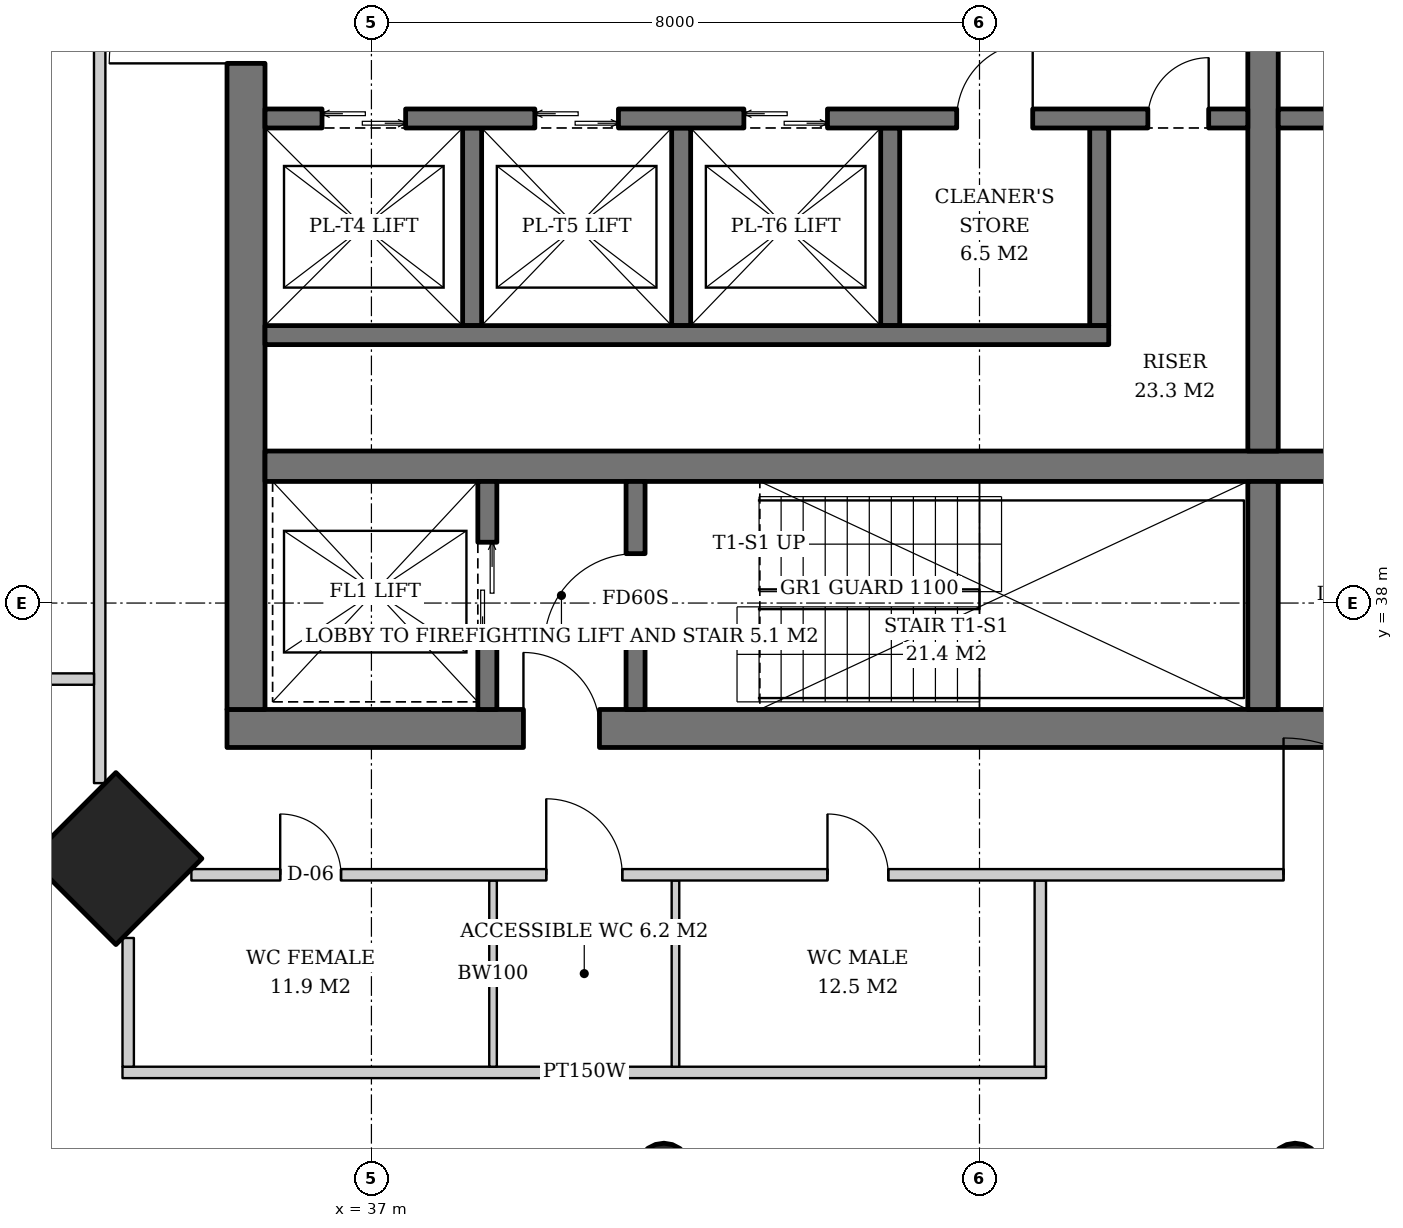
"""IFC4 building model, lengths in metres.
Left out: names, types, materials, properties, quantities, classifications, styles, units other than length and angle.
Written with IfcOpenShell. Run it as: python <this file> out.ifc"""

import sys

from ifc_helpers import new_model, si_unit, direction, frame, frame_2d, origin, origin_2d, place, context, subcontext, project, spatial, rectangle, hollow_circle, extrude, element, fill, save


model = new_model("IFC4")
c1 = context("Model", 3, precision=1e-05, world=origin(), true_north=direction((0.0, 1.0)))
c2 = subcontext(c1, "Body", "Model", "MODEL_VIEW")
j1 = project(units=[si_unit("LENGTHUNIT", "METRE"), si_unit("PLANEANGLEUNIT", "RADIAN")], contexts=[c1])
p1 = place(None, origin())
s1 = spatial("IfcSite", under=j1, at=p1, CompositionType="ELEMENT")
p2 = place(p1, origin())
s2 = spatial("IfcBuilding", under=s1, at=p2, CompositionType="ELEMENT")
p3 = place(p2, frame((0.0, 0.0, 287.0)))
s3 = spatial("IfcBuildingStorey", under=s2, at=p3, CompositionType="ELEMENT", Elevation=287.0)
p4 = place(p3, frame((33.6, 34.6, 0.0), z_axis=(0.031898107953, 0.031898107953, 0.998981992539), x_axis=(-0.707106781187, 0.707106781187, 0.0)))
e1 = element("IfcColumn", 1, at=p4, inside=s3, PredefinedType="COLUMN", context=c2, shape_type="SweptSolid", body=[
    extrude(rectangle(XDim=1.6, YDim=1.6, at=origin_2d()), origin(), (0.0, 0.0, 1.0), 3.804),
])
p5 = place(p3, frame((32.5, 30.5, 0.0), z_axis=(0.031898107953, 0.031898107953, 0.998981992539), x_axis=(-0.707106781187, 0.707106781187, 0.0)))
e2 = element("IfcColumn", 2, at=p5, inside=s3, PredefinedType="COLUMN", context=c2, shape_type="SweptSolid", body=[
    extrude(hollow_circle(Radius=0.355, WallThickness=0.025, at=origin_2d()), origin(), (0.0, 0.0, 1.0), 3.804),
])
for number, where, z_axis, x_axis in (
    (3, (40.833, 30.5, 0.0), (0.011, 0.032, 0.999), (-0.948, 0.317, 0.0)),
    (4, (49.167, 30.5, 0.0), (-0.011, 0.032, 0.999), (-0.948, -0.317, 0.0)),
):
    element("IfcColumn", number, at=place(p3, frame(where, z_axis=z_axis, x_axis=x_axis)), inside=s3, PredefinedType="COLUMN", context=c2, shape_type="SweptSolid", body=[
        extrude(hollow_circle(Radius=0.355, WallThickness=0.025, at=origin_2d()), origin(), (0.0, 0.0, 1.0), 3.802),
    ])
p6 = place(p3, frame((35.1, 36.35, 0.0), z_axis=(0.0, 0.0, 1.0), x_axis=(1.0, 0.0, 0.0)))
e5 = element("IfcWall", 5, at=p6, inside=s3, PredefinedType="SHEAR", context=c2, shape_type="SweptSolid", body=[
    extrude(rectangle(XDim=19.8, YDim=0.5, at=frame_2d((9.9, 0.0))), origin(), (0.0, 0.0, 1.0), 3.8),
])
p7 = place(p6, frame((3.9, 0.0, 0.0)))
e6 = element("IfcOpeningElement", 6, at=p7, cuts=e5, PredefinedType="OPENING", context=c2, shape_type="SweptSolid", body=[
    extrude(rectangle(XDim=1.0, YDim=2.1, at=frame_2d((0.5, 1.05))), frame((0.0, 0.26, 0.0), z_axis=(0.0, -1.0, 0.0), x_axis=(1.0, 0.0, 0.0)), (0.0, 0.0, 1.0), 0.52),
])
p8 = place(p6, frame((15.35, 0.0, 0.0)))
e7 = element("IfcOpeningElement", 7, at=p8, cuts=e5, PredefinedType="OPENING", context=c2, shape_type="SweptSolid", body=[
    extrude(rectangle(XDim=1.0, YDim=2.1, at=frame_2d((0.5, 1.05))), frame((0.0, 0.26, 0.0), z_axis=(0.0, -1.0, 0.0), x_axis=(1.0, 0.0, 0.0)), (0.0, 0.0, 1.0), 0.52),
])
p9 = place(p3, frame((35.35, 36.6, 0.0), z_axis=(0.0, 0.0, 1.0), x_axis=(0.0, 1.0, 0.0)))
e8 = element("IfcWall", 8, at=p9, inside=s3, PredefinedType="SHEAR", context=c2, shape_type="SweptSolid", body=[
    extrude(rectangle(XDim=18.8, YDim=0.5, at=frame_2d((9.4, 0.0))), origin(), (0.0, 0.0, 1.0), 3.8),
])
p10 = place(p9, frame((8.5, 0.0, 0.0)))
e9 = element("IfcOpeningElement", 9, at=p10, cuts=e8, PredefinedType="OPENING", context=c2, shape_type="SweptSolid", body=[
    extrude(rectangle(XDim=1.8, YDim=2.4, at=frame_2d((0.9, 1.2))), frame((0.0, 0.26, 0.0), z_axis=(0.0, -1.0, 0.0), x_axis=(1.0, 0.0, 0.0)), (0.0, 0.0, 1.0), 0.52),
])
p11 = place(p3, frame((35.6, 39.8, 0.0), z_axis=(0.0, 0.0, 1.0), x_axis=(1.0, 0.0, 0.0)))
e10 = element("IfcWall", 10, at=p11, inside=s3, PredefinedType="SHEAR", context=c2, shape_type="SweptSolid", body=[
    extrude(rectangle(XDim=18.8, YDim=0.4, at=frame_2d((9.4, 0.0))), origin(), (0.0, 0.0, 1.0), 3.8),
])
p12 = place(p3, frame((48.73, 36.6, 0.0), z_axis=(0.0, 0.0, 1.0), x_axis=(0.0, 1.0, 0.0)))
e11 = element("IfcWall", 11, at=p12, inside=s3, PredefinedType="SHEAR", context=c2, shape_type="SweptSolid", body=[
    extrude(rectangle(XDim=3.0, YDim=0.4, at=frame_2d((1.5, 0.0))), origin(), (0.0, 0.0, 1.0), 3.8),
])
p13 = place(p3, frame((48.73, 40.0, 0.0), z_axis=(0.0, 0.0, 1.0), x_axis=(0.0, 1.0, 0.0)))
e12 = element("IfcWall", 12, at=p13, inside=s3, PredefinedType="SHEAR", context=c2, shape_type="SweptSolid", body=[
    extrude(rectangle(XDim=12.0, YDim=0.4, at=frame_2d((6.0, 0.0))), origin(), (0.0, 0.0, 1.0), 3.8),
])
p14 = place(p3, frame((38.525, 36.6, 0.0), z_axis=(0.0, 0.0, 1.0), x_axis=(0.0, 1.0, 0.0)))
e13 = element("IfcWall", 13, at=p14, inside=s3, PredefinedType="SHEAR", context=c2, shape_type="SweptSolid", body=[
    extrude(rectangle(XDim=3.0, YDim=0.25, at=frame_2d((1.5, 0.0))), origin(), (0.0, 0.0, 1.0), 3.8),
])
p15 = place(p14, frame((0.9, 0.0, 0.0)))
e14 = element("IfcOpeningElement", 14, at=p15, cuts=e13, PredefinedType="OPENING", context=c2, shape_type="SweptSolid", body=[
    extrude(rectangle(XDim=1.3, YDim=2.2, at=frame_2d((0.65, 1.1))), frame((0.0, 0.135, 0.0), z_axis=(0.0, -1.0, 0.0), x_axis=(1.0, 0.0, 0.0)), (0.0, 0.0, 1.0), 0.27),
])
p16 = place(p3, frame((40.475, 36.6, 0.0), z_axis=(0.0, 0.0, 1.0), x_axis=(0.0, 1.0, 0.0)))
e15 = element("IfcWall", 15, at=p16, inside=s3, PredefinedType="SHEAR", context=c2, shape_type="SweptSolid", body=[
    extrude(rectangle(XDim=3.0, YDim=0.25, at=frame_2d((1.5, 0.0))), origin(), (0.0, 0.0, 1.0), 3.8),
])
p17 = place(p16, frame((0.85, 0.0, 0.0)))
e16 = element("IfcOpeningElement", 16, at=p17, cuts=e15, PredefinedType="OPENING", context=c2, shape_type="SweptSolid", body=[
    extrude(rectangle(XDim=1.2, YDim=2.1, at=frame_2d((0.6, 1.05))), frame((0.0, 0.135, 0.0), z_axis=(0.0, -1.0, 0.0), x_axis=(1.0, 0.0, 0.0)), (0.0, 0.0, 1.0), 0.27),
])
for number, where, z_axis, x_axis in (
    (17, (38.325, 44.25, 0.0), (0.0, 0.0, 1.0), (0.0, -1.0, 0.0)),
    (18, (41.075, 44.25, 0.0), (0.0, 0.0, 1.0), (0.0, -1.0, 0.0)),
    (19, (43.825, 44.25, 0.0), (0.0, 0.0, 1.0), (0.0, -1.0, 0.0)),
    (20, (46.575, 44.25, 0.0), (0.0, 0.0, 1.0), (0.0, -1.0, 0.0)),
):
    element("IfcWall", number, at=place(p3, frame(where, z_axis=z_axis, x_axis=x_axis)), inside=s3, PredefinedType="SHEAR", context=c2, shape_type="SweptSolid", body=[
        extrude(rectangle(XDim=2.6, YDim=0.25, at=frame_2d((1.3, 0.0))), origin(), (0.0, 0.0, 1.0), 3.8),
    ])
p18 = place(p3, frame((35.6, 41.525, 0.0), z_axis=(0.0, 0.0, 1.0), x_axis=(1.0, 0.0, 0.0)))
e21 = element("IfcWall", 21, at=p18, inside=s3, PredefinedType="SHEAR", context=c2, shape_type="SweptSolid", body=[
    extrude(rectangle(XDim=11.1, YDim=0.25, at=frame_2d((5.55, 0.0))), origin(), (0.0, 0.0, 1.0), 3.8),
])
p19 = place(p3, frame((35.6, 44.375, 0.0), z_axis=(0.0, 0.0, 1.0), x_axis=(1.0, 0.0, 0.0)))
e22 = element("IfcWall", 22, at=p19, inside=s3, PredefinedType="SHEAR", context=c2, shape_type="SweptSolid", body=[
    extrude(rectangle(XDim=12.93, YDim=0.25, at=frame_2d((6.465, 0.0))), origin(), (0.0, 0.0, 1.0), 3.8),
])
p20 = place(p19, frame((0.75, 0.0, 0.0)))
e23 = element("IfcOpeningElement", 23, at=p20, cuts=e22, PredefinedType="OPENING", context=c2, shape_type="SweptSolid", body=[
    extrude(rectangle(XDim=1.1, YDim=2.2, at=frame_2d((0.55, 1.1))), frame((0.0, 0.135, 0.0), z_axis=(0.0, -1.0, 0.0), x_axis=(1.0, 0.0, 0.0)), (0.0, 0.0, 1.0), 0.27),
])
p21 = place(p19, frame((3.55, 0.0, 0.0)))
e24 = element("IfcOpeningElement", 24, at=p21, cuts=e22, PredefinedType="OPENING", context=c2, shape_type="SweptSolid", body=[
    extrude(rectangle(XDim=1.1, YDim=2.2, at=frame_2d((0.55, 1.1))), frame((0.0, 0.135, 0.0), z_axis=(0.0, -1.0, 0.0), x_axis=(1.0, 0.0, 0.0)), (0.0, 0.0, 1.0), 0.27),
])
p22 = place(p19, frame((6.3, 0.0, 0.0)))
e25 = element("IfcOpeningElement", 25, at=p22, cuts=e22, PredefinedType="OPENING", context=c2, shape_type="SweptSolid", body=[
    extrude(rectangle(XDim=1.1, YDim=2.2, at=frame_2d((0.55, 1.1))), frame((0.0, 0.135, 0.0), z_axis=(0.0, -1.0, 0.0), x_axis=(1.0, 0.0, 0.0)), (0.0, 0.0, 1.0), 0.27),
])
p23 = place(p19, frame((9.1, 0.0, 0.0)))
e26 = element("IfcOpeningElement", 26, at=p23, cuts=e22, PredefinedType="OPENING", context=c2, shape_type="SweptSolid", body=[
    extrude(rectangle(XDim=1.0, YDim=2.1, at=frame_2d((0.5, 1.05))), frame((0.0, 0.135, 0.0), z_axis=(0.0, -1.0, 0.0), x_axis=(1.0, 0.0, 0.0)), (0.0, 0.0, 1.0), 0.27),
])
p24 = place(p19, frame((11.615, 0.0, 0.0)))
e27 = element("IfcOpeningElement", 27, at=p24, cuts=e22, PredefinedType="OPENING", context=c2, shape_type="SweptSolid", body=[
    extrude(rectangle(XDim=0.8, YDim=2.0, at=frame_2d((0.4, 1.0))), frame((0.0, 0.135, 0.0), z_axis=(0.0, -1.0, 0.0), x_axis=(1.0, 0.0, 0.0)), (0.0, 0.0, 1.0), 0.27),
])
p25 = place(p3, frame((48.93, 44.375, 0.0), z_axis=(0.0, 0.0, 1.0), x_axis=(1.0, 0.0, 0.0)))
e28 = element("IfcWall", 28, at=p25, inside=s3, PredefinedType="SHEAR", context=c2, shape_type="SweptSolid", body=[
    extrude(rectangle(XDim=5.47, YDim=0.25, at=frame_2d((2.735, 0.0))), origin(), (0.0, 0.0, 1.0), 3.8),
])
p26 = place(p25, frame((0.78, 0.0, 0.0)))
e29 = element("IfcOpeningElement", 29, at=p26, cuts=e28, PredefinedType="OPENING", context=c2, shape_type="SweptSolid", body=[
    extrude(rectangle(XDim=1.0, YDim=2.1, at=frame_2d((0.5, 1.05))), frame((0.0, 0.135, 0.0), z_axis=(0.0, -1.0, 0.0), x_axis=(1.0, 0.0, 0.0)), (0.0, 0.0, 1.0), 0.27),
])
p27 = place(p25, frame((3.64, 0.0, 0.0)))
e30 = element("IfcOpeningElement", 30, at=p27, cuts=e28, PredefinedType="OPENING", context=c2, shape_type="SweptSolid", body=[
    extrude(rectangle(XDim=1.0, YDim=2.1, at=frame_2d((0.5, 1.05))), frame((0.0, 0.135, 0.0), z_axis=(0.0, -1.0, 0.0), x_axis=(1.0, 0.0, 0.0)), (0.0, 0.0, 1.0), 0.27),
])
p28 = place(p3, frame((33.425, 56.369, 0.0), z_axis=(0.0, 0.0, 1.0), x_axis=(0.0, -1.0, 0.0)))
e31 = element("IfcWall", 31, at=p28, inside=s3, PredefinedType="PARTITIONING", context=c2, shape_type="SweptSolid", body=[
    extrude(rectangle(XDim=20.737, YDim=0.15, at=frame_2d((10.369, 0.0))), origin(), (0.0, 0.0, 1.0), 2.95),
])
p29 = place(p28, frame((8.181, 0.0, 0.0)))
e32 = element("IfcOpeningElement", 32, at=p29, cuts=e31, PredefinedType="OPENING", context=c2, shape_type="SweptSolid", body=[
    extrude(rectangle(XDim=1.8, YDim=2.4, at=frame_2d((0.9, 1.2))), frame((0.0, 0.085, 0.0), z_axis=(0.0, -1.0, 0.0), x_axis=(1.0, 0.0, 0.0)), (0.0, 0.0, 1.0), 0.17),
])
p30 = place(p3, frame((33.35, 37.0, 0.0), z_axis=(0.0, 0.0, 1.0), x_axis=(-1.0, 0.0, 0.0)))
e33 = element("IfcWall", 33, at=p30, inside=s3, PredefinedType="PARTITIONING", context=c2, shape_type="SweptSolid", body=[
    extrude(rectangle(XDim=4.89, YDim=0.15, at=frame_2d((2.445, 0.0))), origin(), (0.0, 0.0, 1.0), 3.05),
])
p31 = place(p3, frame((33.725, 31.825, 0.0), z_axis=(0.0, 0.0, 1.0), x_axis=(1.0, 0.0, 0.0)))
e34 = element("IfcWall", 34, at=p31, inside=s3, PredefinedType="PARTITIONING", context=c2, shape_type="SweptSolid", body=[
    extrude(rectangle(XDim=12.15, YDim=0.15, at=frame_2d((6.075, 0.0))), origin(), (0.0, 0.0, 1.0), 2.95),
])
p32 = place(p3, frame((33.8, 33.594, 0.0), z_axis=(0.0, 0.0, 1.0), x_axis=(0.0, -1.0, 0.0)))
e35 = element("IfcWall", 35, at=p32, inside=s3, PredefinedType="PARTITIONING", context=c2, shape_type="SweptSolid", body=[
    extrude(rectangle(XDim=1.694, YDim=0.15, at=frame_2d((0.847, 0.0))), origin(), (0.0, 0.0, 1.0), 3.55),
])
for number, where, z_axis, x_axis in (
    (36, (38.6, 34.35, 0.0), (0.0, 0.0, 1.0), (0.0, -1.0, 0.0)),
    (37, (41.0, 34.35, 0.0), (0.0, 0.0, 1.0), (0.0, -1.0, 0.0)),
):
    element("IfcWall", number, at=place(p3, frame(where, z_axis=z_axis, x_axis=x_axis)), inside=s3, PredefinedType="SOLIDWALL", context=c2, shape_type="SweptSolid", body=[
        extrude(rectangle(XDim=2.45, YDim=0.1, at=frame_2d((1.225, 0.0))), origin(), (0.0, 0.0, 1.0), 3.55),
    ])
p33 = place(p3, frame((45.8, 34.35, 0.0), z_axis=(0.0, 0.0, 1.0), x_axis=(0.0, -1.0, 0.0)))
e38 = element("IfcWall", 38, at=p33, inside=s3, PredefinedType="PARTITIONING", context=c2, shape_type="SweptSolid", body=[
    extrude(rectangle(XDim=2.45, YDim=0.15, at=frame_2d((1.225, 0.0))), origin(), (0.0, 0.0, 1.0), 3.55),
])
p34 = place(p3, frame((34.631, 34.425, 0.0), z_axis=(0.0, 0.0, 1.0), x_axis=(1.0, 0.0, 0.0)))
e39 = element("IfcWall", 39, at=p34, inside=s3, PredefinedType="PARTITIONING", context=c2, shape_type="SweptSolid", body=[
    extrude(rectangle(XDim=20.737, YDim=0.15, at=frame_2d((10.369, 0.0))), origin(), (0.0, 0.0, 1.0), 2.95),
])
p35 = place(p34, frame((1.169, 0.0, 0.0)))
e40 = element("IfcOpeningElement", 40, at=p35, cuts=e39, PredefinedType="OPENING", context=c2, shape_type="SweptSolid", body=[
    extrude(rectangle(XDim=0.8, YDim=2.1, at=frame_2d((0.4, 1.05))), frame((0.0, 0.085, 0.0), z_axis=(0.0, -1.0, 0.0), x_axis=(1.0, 0.0, 0.0)), (0.0, 0.0, 1.0), 0.17),
])
p36 = place(p34, frame((4.669, 0.0, 0.0)))
e41 = element("IfcOpeningElement", 41, at=p36, cuts=e39, PredefinedType="OPENING", context=c2, shape_type="SweptSolid", body=[
    extrude(rectangle(XDim=1.0, YDim=2.1, at=frame_2d((0.5, 1.05))), frame((0.0, 0.085, 0.0), z_axis=(0.0, -1.0, 0.0), x_axis=(1.0, 0.0, 0.0)), (0.0, 0.0, 1.0), 0.17),
])
p37 = place(p34, frame((8.369, 0.0, 0.0)))
e42 = element("IfcOpeningElement", 42, at=p37, cuts=e39, PredefinedType="OPENING", context=c2, shape_type="SweptSolid", body=[
    extrude(rectangle(XDim=0.8, YDim=2.1, at=frame_2d((0.4, 1.05))), frame((0.0, 0.085, 0.0), z_axis=(0.0, -1.0, 0.0), x_axis=(1.0, 0.0, 0.0)), (0.0, 0.0, 1.0), 0.17),
])
p38 = place(p34, frame((14.369, 0.0, 0.0)))
e43 = element("IfcOpeningElement", 43, at=p38, cuts=e39, PredefinedType="OPENING", context=c2, shape_type="SweptSolid", body=[
    extrude(rectangle(XDim=1.8, YDim=2.4, at=frame_2d((0.9, 1.2))), frame((0.0, 0.085, 0.0), z_axis=(0.0, -1.0, 0.0), x_axis=(1.0, 0.0, 0.0)), (0.0, 0.0, 1.0), 0.17),
])
p39 = place(p15, origin())
e44 = element("IfcDoor", 44, at=p39, inside=s3, OperationType="DOUBLE_DOOR_SLIDING", PredefinedType="DOOR", context=c2, shape_type="SweptSolid", body=[
    extrude(rectangle(XDim=1.3, YDim=2.2, at=frame_2d((0.65, 1.1))), frame((0.0, 0.025, 0.0), z_axis=(0.0, -1.0, 0.0), x_axis=(1.0, 0.0, 0.0)), (0.0, 0.0, 1.0), 0.05),
])
fill(e14, e44)
p40 = place(p17, origin())
e45 = element("IfcDoor", 45, at=p40, inside=s3, OperationType="SINGLE_SWING_LEFT", PredefinedType="DOOR", context=c2, shape_type="SweptSolid", body=[
    extrude(rectangle(XDim=1.2, YDim=2.1, at=frame_2d((0.6, 1.05))), frame((0.0, 0.025, 0.0), z_axis=(0.0, -1.0, 0.0), x_axis=(1.0, 0.0, 0.0)), (0.0, 0.0, 1.0), 0.05),
])
fill(e16, e45)
p41 = place(p20, origin())
e46 = element("IfcDoor", 46, at=p41, inside=s3, OperationType="DOUBLE_DOOR_SLIDING", PredefinedType="DOOR", context=c2, shape_type="SweptSolid", body=[
    extrude(rectangle(XDim=1.1, YDim=2.2, at=frame_2d((0.55, 1.1))), frame((0.0, 0.025, 0.0), z_axis=(0.0, -1.0, 0.0), x_axis=(1.0, 0.0, 0.0)), (0.0, 0.0, 1.0), 0.05),
])
fill(e23, e46)
p42 = place(p21, origin())
e47 = element("IfcDoor", 47, at=p42, inside=s3, OperationType="DOUBLE_DOOR_SLIDING", PredefinedType="DOOR", context=c2, shape_type="SweptSolid", body=[
    extrude(rectangle(XDim=1.1, YDim=2.2, at=frame_2d((0.55, 1.1))), frame((0.0, 0.025, 0.0), z_axis=(0.0, -1.0, 0.0), x_axis=(1.0, 0.0, 0.0)), (0.0, 0.0, 1.0), 0.05),
])
fill(e24, e47)
p43 = place(p22, origin())
e48 = element("IfcDoor", 48, at=p43, inside=s3, OperationType="DOUBLE_DOOR_SLIDING", PredefinedType="DOOR", context=c2, shape_type="SweptSolid", body=[
    extrude(rectangle(XDim=1.1, YDim=2.2, at=frame_2d((0.55, 1.1))), frame((0.0, 0.025, 0.0), z_axis=(0.0, -1.0, 0.0), x_axis=(1.0, 0.0, 0.0)), (0.0, 0.0, 1.0), 0.05),
])
fill(e25, e48)
p44 = place(p23, origin())
e49 = element("IfcDoor", 49, at=p44, inside=s3, OperationType="SINGLE_SWING_RIGHT", PredefinedType="DOOR", context=c2, shape_type="SweptSolid", body=[
    extrude(rectangle(XDim=1.0, YDim=2.1, at=frame_2d((0.5, 1.05))), frame((0.0, 0.025, 0.0), z_axis=(0.0, -1.0, 0.0), x_axis=(1.0, 0.0, 0.0)), (0.0, 0.0, 1.0), 0.05),
])
fill(e26, e49)
p45 = place(p24, origin())
e50 = element("IfcDoor", 50, at=p45, inside=s3, OperationType="SINGLE_SWING_RIGHT", PredefinedType="DOOR", context=c2, shape_type="SweptSolid", body=[
    extrude(rectangle(XDim=0.8, YDim=2.0, at=frame_2d((0.4, 1.0))), frame((0.0, 0.025, 0.0), z_axis=(0.0, -1.0, 0.0), x_axis=(1.0, 0.0, 0.0)), (0.0, 0.0, 1.0), 0.05),
])
fill(e27, e50)
p46 = place(p7, origin())
e51 = element("IfcDoor", 51, at=p46, inside=s3, OperationType="SINGLE_SWING_LEFT", PredefinedType="DOOR", context=c2, shape_type="SweptSolid", body=[
    extrude(rectangle(XDim=1.0, YDim=2.1, at=frame_2d((0.5, 1.05))), frame((0.0, 0.025, 0.0), z_axis=(0.0, -1.0, 0.0), x_axis=(1.0, 0.0, 0.0)), (0.0, 0.0, 1.0), 0.05),
])
fill(e6, e51)
p47 = place(p10, origin())
e52 = element("IfcDoor", 52, at=p47, inside=s3, OperationType="DOUBLE_DOOR_SINGLE_SWING", PredefinedType="DOOR", context=c2, shape_type="SweptSolid", body=[
    extrude(rectangle(XDim=1.8, YDim=2.4, at=frame_2d((0.9, 1.2))), frame((0.0, 0.025, 0.0), z_axis=(0.0, -1.0, 0.0), x_axis=(1.0, 0.0, 0.0)), (0.0, 0.0, 1.0), 0.05),
])
fill(e9, e52)
p48 = place(p35, origin())
e53 = element("IfcDoor", 53, at=p48, inside=s3, OperationType="SINGLE_SWING_LEFT", PredefinedType="DOOR", context=c2, shape_type="SweptSolid", body=[
    extrude(rectangle(XDim=0.8, YDim=2.1, at=frame_2d((0.4, 1.05))), frame((0.0, 0.025, 0.0), z_axis=(0.0, -1.0, 0.0), x_axis=(1.0, 0.0, 0.0)), (0.0, 0.0, 1.0), 0.05),
])
fill(e40, e53)
p49 = place(p36, origin())
e54 = element("IfcDoor", 54, at=p49, inside=s3, OperationType="SINGLE_SWING_LEFT", PredefinedType="DOOR", context=c2, shape_type="SweptSolid", body=[
    extrude(rectangle(XDim=1.0, YDim=2.1, at=frame_2d((0.5, 1.05))), frame((0.0, 0.025, 0.0), z_axis=(0.0, -1.0, 0.0), x_axis=(1.0, 0.0, 0.0)), (0.0, 0.0, 1.0), 0.05),
])
fill(e41, e54)
p50 = place(p37, origin())
e55 = element("IfcDoor", 55, at=p50, inside=s3, OperationType="SINGLE_SWING_LEFT", PredefinedType="DOOR", context=c2, shape_type="SweptSolid", body=[
    extrude(rectangle(XDim=0.8, YDim=2.1, at=frame_2d((0.4, 1.05))), frame((0.0, 0.025, 0.0), z_axis=(0.0, -1.0, 0.0), x_axis=(1.0, 0.0, 0.0)), (0.0, 0.0, 1.0), 0.05),
])
fill(e42, e55)
p51 = place(p38, origin())
e56 = element("IfcDoor", 56, at=p51, inside=s3, OperationType="DOUBLE_DOOR_SINGLE_SWING", PredefinedType="DOOR", context=c2, shape_type="SweptSolid", body=[
    extrude(rectangle(XDim=1.8, YDim=2.4, at=frame_2d((0.9, 1.2))), frame((0.0, 0.025, 0.0), z_axis=(0.0, -1.0, 0.0), x_axis=(1.0, 0.0, 0.0)), (0.0, 0.0, 1.0), 0.05),
])
fill(e43, e56)
save(model, sys.argv[1])
